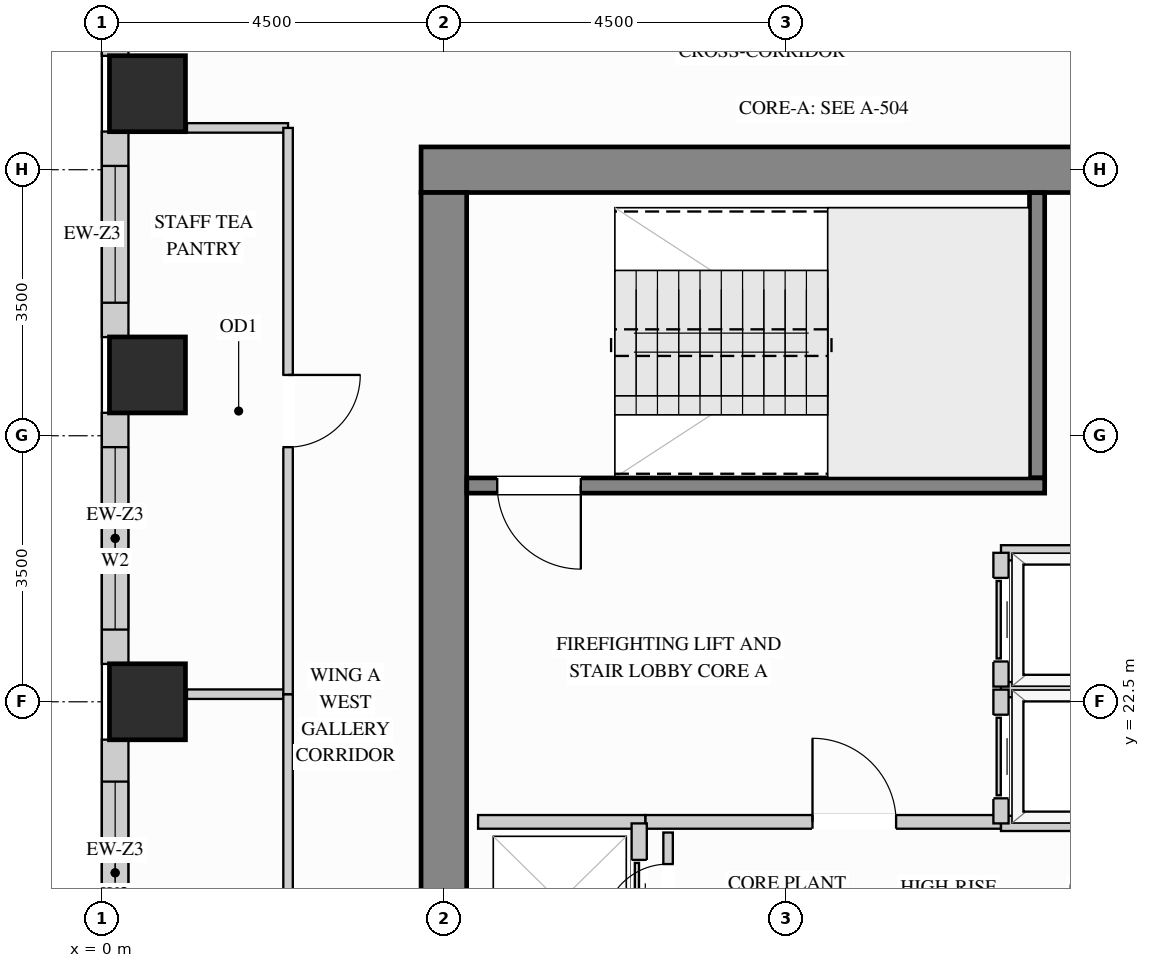
"""IFC4 building model, lengths in metres.
Left out: names, types, materials, properties, quantities, classifications, styles, units other than length and angle.
Written with IfcOpenShell. Run it as: python <this file> out.ifc"""

import sys

from ifc_helpers import new_model, si_unit, direction, frame, frame_2d, origin, origin_2d, place, context, subcontext, project, spatial, rectangle, extrude, source, transform, mapped, element, fill, save


model = new_model("IFC4")
c1 = context("Model", 3, precision=1e-05, world=origin(), true_north=direction((0.0, 1.0)))
c2 = subcontext(c1, "Body", "Model", "MODEL_VIEW")
j1 = project(units=[si_unit("LENGTHUNIT", "METRE"), si_unit("PLANEANGLEUNIT", "RADIAN")], contexts=[c1])
p1 = place(None, origin())
s1 = spatial("IfcSite", under=j1, at=p1, CompositionType="ELEMENT")
p2 = place(p1, origin())
s2 = spatial("IfcBuilding", under=s1, at=p2, CompositionType="ELEMENT")
p3 = place(p2, frame((0.0, 0.0, 197.1)))
s3 = spatial("IfcBuildingStorey", under=s2, at=p3, CompositionType="ELEMENT", Elevation=197.1)
m1 = source(origin(), c2, "Body", "SweptSolid", [
    extrude(rectangle(XDim=1.0, YDim=1.0, at=origin_2d()), origin(), (0.0, 0.0, 1.0), 3.4),
])
for number, where, z_axis, x_axis in (
    (1, (0.6, 22.5, 0.0), (0.0, 0.0, 1.0), (1.0, 0.0, 0.0)),
    (2, (0.6, 26.8, 0.0), (0.0, 0.0, 1.0), (1.0, 0.0, 0.0)),
    (3, (0.6, 30.5, 0.0), (0.0, 0.0, 1.0), (1.0, 0.0, 0.0)),
):
    element("IfcColumn", number, at=place(p3, frame(where, z_axis=z_axis, x_axis=x_axis)), inside=s3, PredefinedType="COLUMN", context=c2, shape_type="MappedRepresentation", body=[
        mapped(m1, transform((0.0, 0.0, 0.0), x_axis=(1.0, 0.0, 0.0), y_axis=(0.0, 1.0, 0.0), z_axis=(0.0, 0.0, 1.0))),
    ])
m2 = source(origin(), c2, "Body", "SweptSolid", [
    extrude(rectangle(XDim=10.6, YDim=0.6, at=frame_2d((5.3, 0.0))), origin(), (0.0, 0.0, 1.0), 3.4),
])
p4 = place(p3, frame((4.2, 29.5, 0.0), z_axis=(0.0, 0.0, 1.0), x_axis=(1.0, 0.0, 0.0)))
e4 = element("IfcWall", 4, at=p4, inside=s3, PredefinedType="SHEAR", context=c2, shape_type="MappedRepresentation", body=[
    mapped(m2, transform((0.0, 0.0, 0.0), x_axis=(1.0, 0.0, 0.0), y_axis=(0.0, 1.0, 0.0), z_axis=(0.0, 0.0, 1.0))),
])
m3 = source(origin(), c2, "Body", "SweptSolid", [
    extrude(rectangle(XDim=20.4, YDim=0.6, at=frame_2d((10.2, 0.0))), origin(), (0.0, 0.0, 1.0), 3.4),
])
p5 = place(p3, frame((4.5, 8.8, 0.0), z_axis=(0.0, 0.0, 1.0), x_axis=(0.0, 1.0, 0.0)))
e5 = element("IfcWall", 5, at=p5, inside=s3, PredefinedType="SHEAR", context=c2, shape_type="MappedRepresentation", body=[
    mapped(m3, transform((0.0, 0.0, 0.0), x_axis=(1.0, 0.0, 0.0), y_axis=(0.0, 1.0, 0.0), z_axis=(0.0, 0.0, 1.0))),
])
p6 = place(p3, frame((0.175, 34.502, 0.0), z_axis=(0.0, 0.0, 1.0), x_axis=(0.0, -1.0, 0.0)))
e6 = element("IfcWall", 6, at=p6, inside=s3, PredefinedType="SOLIDWALL", context=c2, shape_type="SweptSolid", body=[
    extrude(rectangle(XDim=3.504, YDim=0.35, at=frame_2d((1.752, 0.0))), origin(), (0.0, 0.0, 1.0), 2.612),
])
p7 = place(p6, frame((0.511, 0.0, 0.78)))
e7 = element("IfcOpeningElement", 7, at=p7, cuts=e6, PredefinedType="OPENING", context=c2, shape_type="SweptSolid", body=[
    extrude(rectangle(XDim=1.2, YDim=1.652, at=frame_2d((0.6, 0.826))), frame((0.0, 0.185, 0.0), z_axis=(0.0, -1.0, 0.0), x_axis=(1.0, 0.0, 0.0)), (0.0, 0.0, 1.0), 0.37),
])
p8 = place(p3, frame((0.175, 30.002, 0.0), z_axis=(0.0, 0.0, 1.0), x_axis=(0.0, -1.0, 0.0)))
e8 = element("IfcWall", 8, at=p8, inside=s3, PredefinedType="SOLIDWALL", context=c2, shape_type="SweptSolid", body=[
    extrude(rectangle(XDim=2.704, YDim=0.35, at=frame_2d((1.352, 0.0))), origin(), (0.0, 0.0, 1.0), 2.612),
])
p9 = place(p8, frame((0.452, 0.0, 0.78)))
e9 = element("IfcOpeningElement", 9, at=p9, cuts=e8, PredefinedType="OPENING", context=c2, shape_type="SweptSolid", body=[
    extrude(rectangle(XDim=1.8, YDim=1.652, at=frame_2d((0.9, 0.826))), frame((0.0, 0.185, 0.0), z_axis=(0.0, -1.0, 0.0), x_axis=(1.0, 0.0, 0.0)), (0.0, 0.0, 1.0), 0.37),
])
p10 = place(p3, frame((0.175, 26.302, 0.0), z_axis=(0.0, 0.0, 1.0), x_axis=(0.0, -1.0, 0.0)))
e10 = element("IfcWall", 10, at=p10, inside=s3, PredefinedType="SOLIDWALL", context=c2, shape_type="SweptSolid", body=[
    extrude(rectangle(XDim=3.304, YDim=0.35, at=frame_2d((1.652, 0.0))), origin(), (0.0, 0.0, 1.0), 2.612),
])
p11 = place(p10, frame((0.452, 0.0, 0.78)))
e11 = element("IfcOpeningElement", 11, at=p11, cuts=e10, PredefinedType="OPENING", context=c2, shape_type="SweptSolid", body=[
    extrude(rectangle(XDim=2.4, YDim=1.652, at=frame_2d((1.2, 0.826))), frame((0.0, 0.185, 0.0), z_axis=(0.0, -1.0, 0.0), x_axis=(1.0, 0.0, 0.0)), (0.0, 0.0, 1.0), 0.37),
])
p12 = place(p3, frame((0.175, 22.002, 0.0), z_axis=(0.0, 0.0, 1.0), x_axis=(0.0, -1.0, 0.0)))
e12 = element("IfcWall", 12, at=p12, inside=s3, PredefinedType="SOLIDWALL", context=c2, shape_type="SweptSolid", body=[
    extrude(rectangle(XDim=3.504, YDim=0.35, at=frame_2d((1.752, 0.0))), origin(), (0.0, 0.0, 1.0), 2.612),
])
p13 = place(p12, frame((0.552, 0.0, 0.78)))
e13 = element("IfcOpeningElement", 13, at=p13, cuts=e12, PredefinedType="OPENING", context=c2, shape_type="SweptSolid", body=[
    extrude(rectangle(XDim=2.4, YDim=1.652, at=frame_2d((1.2, 0.826))), frame((0.0, 0.185, 0.0), z_axis=(0.0, -1.0, 0.0), x_axis=(1.0, 0.0, 0.0)), (0.0, 0.0, 1.0), 0.37),
])
p14 = place(p3, frame((7.15, 20.92, 0.0), z_axis=(0.0, 0.0, 1.0), x_axis=(1.0, 0.0, 0.0)))
e14 = element("IfcWall", 14, at=p14, inside=s3, PredefinedType="PARTITIONING", context=c2, shape_type="SweptSolid", body=[
    extrude(rectangle(XDim=4.68, YDim=0.18, at=frame_2d((2.34, 0.0))), origin(), (0.0, 0.0, 1.0), 3.385),
])
p15 = place(p14, frame((2.2, 0.0, 0.0)))
e15 = element("IfcOpeningElement", 15, at=p15, cuts=e14, PredefinedType="OPENING", context=c2, shape_type="SweptSolid", body=[
    extrude(rectangle(XDim=1.1, YDim=2.15, at=frame_2d((0.55, 1.075))), frame((0.0, 0.1, 0.0), z_axis=(0.0, -1.0, 0.0), x_axis=(1.0, 0.0, 0.0)), (0.0, 0.0, 1.0), 0.2),
])
m4 = source(origin(), c2, "Body", "SweptSolid", [
    extrude(rectangle(XDim=2.2, YDim=0.18, at=frame_2d((1.1, 0.0))), origin(), (0.0, 0.0, 1.0), 3.385),
])
p16 = place(p3, frame((4.95, 20.92, 0.0), z_axis=(0.0, 0.0, 1.0), x_axis=(1.0, 0.0, 0.0)))
e16 = element("IfcWall", 16, at=p16, inside=s3, PredefinedType="PARTITIONING", context=c2, shape_type="MappedRepresentation", body=[
    mapped(m4, transform((0.0, 0.0, 0.0), x_axis=(1.0, 0.0, 0.0), y_axis=(0.0, 1.0, 0.0), z_axis=(0.0, 0.0, 1.0))),
])
p17 = place(p3, frame((7.45, 19.2, 0.0), z_axis=(0.0, 0.0, 1.0), x_axis=(0.0, 1.0, 0.0)))
e17 = element("IfcWall", 17, at=p17, inside=s3, PredefinedType="PARTITIONING", context=c2, shape_type="SweptSolid", body=[
    extrude(rectangle(XDim=1.58, YDim=0.125, at=frame_2d((0.79, 0.0))), origin(), (0.0, 0.0, 1.0), 3.385),
])
p18 = place(p17, frame((0.315, 0.0, 0.0)))
e18 = element("IfcOpeningElement", 18, at=p18, cuts=e17, PredefinedType="OPENING", context=c2, shape_type="SweptSolid", body=[
    extrude(rectangle(XDim=0.85, YDim=2.1, at=frame_2d((0.425, 1.05))), frame((0.0, 0.073, 0.0), z_axis=(0.0, -1.0, 0.0), x_axis=(1.0, 0.0, 0.0)), (0.0, 0.0, 1.0), 0.145),
])
m5 = source(origin(), c2, "Body", "SweptSolid", [
    extrude(rectangle(XDim=1.33, YDim=0.125, at=frame_2d((0.665, 0.0))), origin(), (0.0, 0.0, 1.0), 3.385),
])
for number, where, z_axis, x_axis in (
    (19, (1.12, 30.05, 0.0), (0.0, 0.0, 1.0), (1.0, 0.0, 0.0)),
    (20, (1.12, 22.6, 0.0), (0.0, 0.0, 1.0), (1.0, 0.0, 0.0)),
):
    element("IfcWall", number, at=place(p3, frame(where, z_axis=z_axis, x_axis=x_axis)), inside=s3, PredefinedType="PARTITIONING", context=c2, shape_type="MappedRepresentation", body=[
        mapped(m5, transform((0.0, 0.0, 0.0), x_axis=(1.0, 0.0, 0.0), y_axis=(0.0, 1.0, 0.0), z_axis=(0.0, 0.0, 1.0))),
    ])
p19 = place(p3, frame((2.45, 15.1, 0.0), z_axis=(0.0, 0.0, 1.0), x_axis=(0.0, 1.0, 0.0)))
e21 = element("IfcWall", 21, at=p19, inside=s3, PredefinedType="PARTITIONING", context=c2, shape_type="SweptSolid", body=[
    extrude(rectangle(XDim=7.5, YDim=0.125, at=frame_2d((3.75, 0.0))), origin(), (0.0, 0.0, 1.0), 3.385),
])
p20 = place(p19, frame((3.275, 0.0, 0.0)))
e22 = element("IfcOpeningElement", 22, at=p20, cuts=e21, PredefinedType="OPENING", context=c2, shape_type="SweptSolid", body=[
    extrude(rectangle(XDim=0.95, YDim=2.15, at=frame_2d((0.475, 1.075))), frame((0.0, 0.073, 0.0), z_axis=(0.0, -1.0, 0.0), x_axis=(1.0, 0.0, 0.0)), (0.0, 0.0, 1.0), 0.145),
])
p21 = place(p3, frame((2.45, 22.6, 0.0), z_axis=(0.0, 0.0, 1.0), x_axis=(0.0, 1.0, 0.0)))
e23 = element("IfcWall", 23, at=p21, inside=s3, PredefinedType="PARTITIONING", context=c2, shape_type="SweptSolid", body=[
    extrude(rectangle(XDim=7.45, YDim=0.125, at=frame_2d((3.725, 0.0))), origin(), (0.0, 0.0, 1.0), 3.385),
])
p22 = place(p21, frame((3.25, 0.0, 0.0)))
e24 = element("IfcOpeningElement", 24, at=p22, cuts=e23, PredefinedType="OPENING", context=c2, shape_type="SweptSolid", body=[
    extrude(rectangle(XDim=0.95, YDim=2.15, at=frame_2d((0.475, 1.075))), frame((0.0, 0.073, 0.0), z_axis=(0.0, -1.0, 0.0), x_axis=(1.0, 0.0, 0.0)), (0.0, 0.0, 1.0), 0.145),
])
m6 = source(origin(), c2, "Body", "SweptSolid", [
    extrude(rectangle(XDim=2.34, YDim=0.2, at=frame_2d((1.17, 0.0))), origin(), (0.0, 0.0, 1.0), 3.385),
])
for number, where, z_axis, x_axis in (
    (25, (11.83, 22.66, 0.0), (0.0, 0.0, 1.0), (1.0, 0.0, 0.0)),
    (26, (11.83, 20.9, 0.0), (0.0, 0.0, 1.0), (1.0, 0.0, 0.0)),
):
    element("IfcWall", number, at=place(p3, frame(where, z_axis=z_axis, x_axis=x_axis)), inside=s3, PredefinedType="PARTITIONING", context=c2, shape_type="MappedRepresentation", body=[
        mapped(m6, transform((0.0, 0.0, 0.0), x_axis=(1.0, 0.0, 0.0), y_axis=(0.0, 1.0, 0.0), z_axis=(0.0, 0.0, 1.0))),
    ])
p23 = place(p3, frame((11.83, 20.9, 0.0), z_axis=(0.0, 0.0, 1.0), x_axis=(0.0, 1.0, 0.0)))
e27 = element("IfcWall", 27, at=p23, inside=s3, PredefinedType="PARTITIONING", context=c2, shape_type="SweptSolid", body=[
    extrude(rectangle(XDim=1.76, YDim=0.2, at=frame_2d((0.88, 0.0))), origin(), (0.0, 0.0, 1.0), 3.385),
])
p24 = place(p23, frame((0.33, 0.0, 0.0)))
e28 = element("IfcOpeningElement", 28, at=p24, cuts=e27, PredefinedType="OPENING", context=c2, shape_type="SweptSolid", body=[
    extrude(rectangle(XDim=1.1, YDim=2.2, at=frame_2d((0.55, 1.1))), frame((0.0, 0.11, 0.0), z_axis=(0.0, -1.0, 0.0), x_axis=(1.0, 0.0, 0.0)), (0.0, 0.0, 1.0), 0.22),
])
p25 = place(p3, frame((11.83, 24.46, 0.0), z_axis=(0.0, 0.0, 1.0), x_axis=(1.0, 0.0, 0.0)))
e29 = element("IfcWall", 29, at=p25, inside=s3, PredefinedType="PARTITIONING", context=c2, shape_type="MappedRepresentation", body=[
    mapped(m6, transform((0.0, 0.0, 0.0), x_axis=(1.0, 0.0, 0.0), y_axis=(0.0, 1.0, 0.0), z_axis=(0.0, 0.0, 1.0))),
])
p26 = place(p3, frame((11.83, 22.7, 0.0), z_axis=(0.0, 0.0, 1.0), x_axis=(0.0, 1.0, 0.0)))
e30 = element("IfcWall", 30, at=p26, inside=s3, PredefinedType="PARTITIONING", context=c2, shape_type="SweptSolid", body=[
    extrude(rectangle(XDim=1.76, YDim=0.2, at=frame_2d((0.88, 0.0))), origin(), (0.0, 0.0, 1.0), 3.385),
])
p27 = place(p26, frame((0.33, 0.0, 0.0)))
e31 = element("IfcOpeningElement", 31, at=p27, cuts=e30, PredefinedType="OPENING", context=c2, shape_type="SweptSolid", body=[
    extrude(rectangle(XDim=1.1, YDim=2.2, at=frame_2d((0.55, 1.1))), frame((0.0, 0.11, 0.0), z_axis=(0.0, -1.0, 0.0), x_axis=(1.0, 0.0, 0.0)), (0.0, 0.0, 1.0), 0.22),
])
p28 = place(p3, frame((7.07, 18.84, 0.0), z_axis=(0.0, 0.0, 1.0), x_axis=(0.0, 1.0, 0.0)))
e32 = element("IfcWall", 32, at=p28, inside=s3, PredefinedType="PARTITIONING", context=c2, shape_type="SweptSolid", body=[
    extrude(rectangle(XDim=2.06, YDim=0.2, at=frame_2d((1.03, 0.0))), origin(), (0.0, 0.0, 1.0), 3.385),
])
p29 = place(p28, frame((0.48, 0.0, 0.0)))
e33 = element("IfcOpeningElement", 33, at=p29, cuts=e32, PredefinedType="OPENING", context=c2, shape_type="SweptSolid", body=[
    extrude(rectangle(XDim=1.1, YDim=2.2, at=frame_2d((0.55, 1.1))), frame((0.0, 0.11, 0.0), z_axis=(0.0, -1.0, 0.0), x_axis=(1.0, 0.0, 0.0)), (0.0, 0.0, 1.0), 0.22),
])
m7 = source(origin(), c2, "Body", "SweptSolid", [
    extrude(rectangle(XDim=3.753, YDim=0.2, at=frame_2d((1.876, 0.0))), origin(), (0.0, 0.0, 1.0), 3.4),
])
p30 = place(p3, frame((12.305, 25.445, 0.0), z_axis=(0.0, 0.0, 1.0), x_axis=(0.0, 1.0, 0.0)))
e34 = element("IfcWall", 34, at=p30, inside=s3, PredefinedType="SHEAR", context=c2, shape_type="MappedRepresentation", body=[
    mapped(m7, transform((0.0, 0.0, 0.0), x_axis=(1.0, 0.0, 0.0), y_axis=(0.0, 1.0, 0.0), z_axis=(0.0, 0.0, 1.0))),
])
p31 = place(p3, frame((4.802, 25.345, 0.0), z_axis=(0.0, 0.0, 1.0), x_axis=(1.0, 0.0, 0.0)))
e35 = element("IfcWall", 35, at=p31, inside=s3, PredefinedType="SHEAR", context=c2, shape_type="SweptSolid", body=[
    extrude(rectangle(XDim=7.603, YDim=0.2, at=frame_2d((3.802, 0.0))), origin(), (0.0, 0.0, 1.0), 3.4),
])
p32 = place(p31, frame((0.4, 0.0, 0.0)))
e36 = element("IfcOpeningElement", 36, at=p32, cuts=e35, PredefinedType="OPENING", context=c2, shape_type="SweptSolid", body=[
    extrude(rectangle(XDim=1.1, YDim=2.15, at=frame_2d((0.55, 1.075))), frame((0.0, 0.11, 0.0), z_axis=(0.0, -1.0, 0.0), x_axis=(1.0, 0.0, 0.0)), (0.0, 0.0, 1.0), 0.22),
])
m8 = source(origin(), c2, "Body", "SweptSolid", [
    extrude(rectangle(XDim=1.1, YDim=2.15, at=frame_2d((0.55, 1.075))), frame((0.0, 0.025, 0.0), z_axis=(0.0, -1.0, 0.0), x_axis=(1.0, 0.0, 0.0)), (0.0, 0.0, 1.0), 0.05),
])
p33 = place(p15, origin())
e37 = element("IfcDoor", 37, at=p33, inside=s3, OperationType="SINGLE_SWING_LEFT", PredefinedType="DOOR", context=c2, shape_type="MappedRepresentation", body=[
    mapped(m8, transform((0.0, 0.0, 0.0), x_axis=(1.0, 0.0, 0.0), y_axis=(0.0, 1.0, 0.0), z_axis=(0.0, 0.0, 1.0))),
])
fill(e15, e37)
m9 = source(origin(), c2, "Body", "SweptSolid", [
    extrude(rectangle(XDim=1.1, YDim=2.2, at=frame_2d((0.55, 1.1))), frame((0.0, 0.025, 0.0), z_axis=(0.0, -1.0, 0.0), x_axis=(1.0, 0.0, 0.0)), (0.0, 0.0, 1.0), 0.05),
])
p34 = place(p24, origin())
e38 = element("IfcDoor", 38, at=p34, inside=s3, OperationType="SLIDING_TO_LEFT", PredefinedType="DOOR", context=c2, shape_type="MappedRepresentation", body=[
    mapped(m9, transform((0.0, 0.0, 0.0), x_axis=(1.0, 0.0, 0.0), y_axis=(0.0, 1.0, 0.0), z_axis=(0.0, 0.0, 1.0))),
])
fill(e28, e38)
p35 = place(p27, origin())
e39 = element("IfcDoor", 39, at=p35, inside=s3, OperationType="SLIDING_TO_LEFT", PredefinedType="DOOR", context=c2, shape_type="MappedRepresentation", body=[
    mapped(m9, transform((0.0, 0.0, 0.0), x_axis=(1.0, 0.0, 0.0), y_axis=(0.0, 1.0, 0.0), z_axis=(0.0, 0.0, 1.0))),
])
fill(e31, e39)
p36 = place(p29, origin())
e40 = element("IfcDoor", 40, at=p36, inside=s3, OperationType="SLIDING_TO_LEFT", PredefinedType="DOOR", context=c2, shape_type="MappedRepresentation", body=[
    mapped(m9, transform((0.0, 0.0, 0.0), x_axis=(1.0, 0.0, 0.0), y_axis=(0.0, 1.0, 0.0), z_axis=(0.0, 0.0, 1.0))),
])
fill(e33, e40)
m10 = source(origin(), c2, "Body", "SweptSolid", [
    extrude(rectangle(XDim=0.95, YDim=2.15, at=frame_2d((0.475, 1.075))), frame((0.0, 0.025, 0.0), z_axis=(0.0, -1.0, 0.0), x_axis=(1.0, 0.0, 0.0)), (0.0, 0.0, 1.0), 0.05),
])
p37 = place(p22, origin())
e41 = element("IfcDoor", 41, at=p37, inside=s3, OperationType="SINGLE_SWING_RIGHT", PredefinedType="DOOR", context=c2, shape_type="MappedRepresentation", body=[
    mapped(m10, transform((0.0, 0.0, 0.0), x_axis=(1.0, 0.0, 0.0), y_axis=(0.0, 1.0, 0.0), z_axis=(0.0, 0.0, 1.0))),
])
fill(e24, e41)
m11 = source(origin(), c2, "Body", "SweptSolid", [
    extrude(rectangle(XDim=0.85, YDim=2.1, at=frame_2d((0.425, 1.05))), frame((0.0, 0.025, 0.0), z_axis=(0.0, -1.0, 0.0), x_axis=(1.0, 0.0, 0.0)), (0.0, 0.0, 1.0), 0.05),
])
p38 = place(p18, origin())
e42 = element("IfcDoor", 42, at=p38, inside=s3, OperationType="SINGLE_SWING_LEFT", PredefinedType="DOOR", context=c2, shape_type="MappedRepresentation", body=[
    mapped(m11, transform((0.0, 0.0, 0.0), x_axis=(1.0, 0.0, 0.0), y_axis=(0.0, 1.0, 0.0), z_axis=(0.0, 0.0, 1.0))),
])
fill(e18, e42)
m12 = source(origin(), c2, "Body", "SweptSolid", [
    extrude(rectangle(XDim=1.1, YDim=2.15, at=frame_2d((0.55, 1.075))), frame((0.0, 0.025, 0.0), z_axis=(0.0, -1.0, 0.0), x_axis=(1.0, 0.0, 0.0)), (0.0, 0.0, 1.0), 0.05),
])
p39 = place(p32, origin())
e43 = element("IfcDoor", 43, at=p39, inside=s3, OperationType="SINGLE_SWING_RIGHT", PredefinedType="DOOR", context=c2, shape_type="MappedRepresentation", body=[
    mapped(m12, transform((0.0, 0.0, 0.0), x_axis=(1.0, 0.0, 0.0), y_axis=(0.0, 1.0, 0.0), z_axis=(0.0, 0.0, 1.0))),
])
fill(e36, e43)
m13 = source(origin(), c2, "Body", "SweptSolid", [
    extrude(rectangle(XDim=1.8, YDim=1.652, at=frame_2d((0.9, 0.826))), frame((0.0, 0.03, 0.0), z_axis=(0.0, -1.0, 0.0), x_axis=(1.0, 0.0, 0.0)), (0.0, 0.0, 1.0), 0.06),
])
p40 = place(p9, origin())
e44 = element("IfcWindow", 44, at=p40, inside=s3, PartitioningType="SINGLE_PANEL", PredefinedType="WINDOW", context=c2, shape_type="MappedRepresentation", body=[
    mapped(m13, transform((0.0, 0.0, 0.0), x_axis=(1.0, 0.0, 0.0), y_axis=(0.0, 1.0, 0.0), z_axis=(0.0, 0.0, 1.0))),
])
fill(e9, e44)
m14 = source(origin(), c2, "Body", "SweptSolid", [
    extrude(rectangle(XDim=2.4, YDim=1.652, at=frame_2d((1.2, 0.826))), frame((0.0, 0.03, 0.0), z_axis=(0.0, -1.0, 0.0), x_axis=(1.0, 0.0, 0.0)), (0.0, 0.0, 1.0), 0.06),
])
p41 = place(p11, origin())
e45 = element("IfcWindow", 45, at=p41, inside=s3, PartitioningType="SINGLE_PANEL", PredefinedType="WINDOW", context=c2, shape_type="MappedRepresentation", body=[
    mapped(m14, transform((0.0, 0.0, 0.0), x_axis=(1.0, 0.0, 0.0), y_axis=(0.0, 1.0, 0.0), z_axis=(0.0, 0.0, 1.0))),
])
fill(e11, e45)
p42 = place(p13, origin())
e46 = element("IfcWindow", 46, at=p42, inside=s3, PartitioningType="SINGLE_PANEL", PredefinedType="WINDOW", context=c2, shape_type="MappedRepresentation", body=[
    mapped(m14, transform((0.0, 0.0, 0.0), x_axis=(1.0, 0.0, 0.0), y_axis=(0.0, 1.0, 0.0), z_axis=(0.0, 0.0, 1.0))),
])
fill(e13, e46)
save(model, sys.argv[1])
